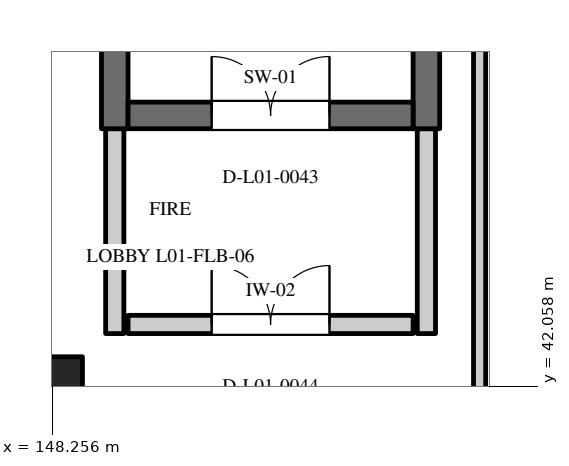
"""IFC4 building model, lengths in metres.
Left out: names, types, materials, properties, quantities, classifications, styles, units other than length and angle.
Written with IfcOpenShell. Run it as: python <this file> out.ifc"""

import sys

from ifc_helpers import new_model, si_unit, direction, frame, frame_2d, origin, origin_2d, place, context, subcontext, project, spatial, rectangle, extrude, element, fill, save


model = new_model("IFC4")
c1 = context("Model", 3, precision=1e-05, world=origin(), true_north=direction((0.0, 1.0)))
c2 = subcontext(c1, "Body", "Model", "MODEL_VIEW")
j1 = project(units=[si_unit("LENGTHUNIT", "METRE"), si_unit("PLANEANGLEUNIT", "RADIAN")], contexts=[c1])
p1 = place(None, origin())
s1 = spatial("IfcSite", under=j1, at=p1, CompositionType="ELEMENT")
p2 = place(p1, origin())
s2 = spatial("IfcBuilding", under=s1, at=p2, CompositionType="ELEMENT")
p3 = place(p2, frame((0.0, 0.0, 4.8)))
s3 = spatial("IfcBuildingStorey", under=s2, at=p3, CompositionType="ELEMENT", Elevation=4.8)
p4 = place(p3, frame((148.2, 42.0, 0.0), z_axis=(0.0, 0.0, 1.0), x_axis=(1.0, 0.0, 0.0)))
e1 = element("IfcColumn", 1, at=p4, inside=s3, PredefinedType="COLUMN", context=c2, shape_type="SweptSolid", body=[
    extrude(rectangle(XDim=0.9, YDim=0.9, at=origin_2d()), origin(), (0.0, 0.0, 1.0), 4.8),
])
for number, where, z_axis, x_axis in (
    (2, (149.075, 45.45, 0.0), (0.0, 0.0, 1.0), (0.0, 1.0, 0.0)),
    (3, (153.175, 45.45, 0.0), (0.0, 0.0, 1.0), (0.0, 1.0, 0.0)),
):
    element("IfcWall", number, at=place(p3, frame(where, z_axis=z_axis, x_axis=x_axis)), inside=s3, PredefinedType="SHEAR", context=c2, shape_type="SweptSolid", body=[
        extrude(rectangle(XDim=10.5, YDim=0.35, at=frame_2d((5.25, 0.0))), origin(), (0.0, 0.0, 1.0), 4.45),
    ])
p5 = place(p3, frame((149.25, 45.625, 0.0), z_axis=(0.0, 0.0, 1.0), x_axis=(1.0, 0.0, 0.0)))
e4 = element("IfcWall", 4, at=p5, inside=s3, PredefinedType="SHEAR", context=c2, shape_type="SweptSolid", body=[
    extrude(rectangle(XDim=3.75, YDim=0.35, at=frame_2d((1.875, 0.0))), origin(), (0.0, 0.0, 1.0), 4.45),
])
p6 = place(p5, frame((1.1, 0.0, 0.0)))
e5 = element("IfcOpeningElement", 5, at=p6, cuts=e4, PredefinedType="OPENING", context=c2, shape_type="SweptSolid", body=[
    extrude(rectangle(XDim=1.55, YDim=2.25, at=frame_2d((0.775, 1.125))), frame((0.0, 0.187, 0.0), z_axis=(0.0, -1.0, 0.0), x_axis=(1.0, 0.0, 0.0)), (0.0, 0.0, 1.0), 0.374),
])
for number, where, z_axis, x_axis in (
    (6, (149.075, 42.755, 0.0), (0.0, 0.0, 1.0), (0.0, 1.0, 0.0)),
    (7, (153.175, 42.755, 0.0), (0.0, 0.0, 1.0), (0.0, 1.0, 0.0)),
):
    element("IfcWall", number, at=place(p3, frame(where, z_axis=z_axis, x_axis=x_axis)), inside=s3, PredefinedType="STANDARD", context=c2, shape_type="SweptSolid", body=[
        extrude(rectangle(XDim=2.695, YDim=0.24, at=frame_2d((1.348, 0.0))), origin(), (0.0, 0.0, 1.0), 4.45),
    ])
p7 = place(p3, frame((149.25, 42.875, 0.0), z_axis=(0.0, 0.0, 1.0), x_axis=(1.0, 0.0, 0.0)))
e8 = element("IfcWall", 8, at=p7, inside=s3, PredefinedType="STANDARD", context=c2, shape_type="SweptSolid", body=[
    extrude(rectangle(XDim=3.75, YDim=0.24, at=frame_2d((1.875, 0.0))), origin(), (0.0, 0.0, 1.0), 4.45),
])
p8 = place(p7, frame((1.1, 0.0, 0.0)))
e9 = element("IfcOpeningElement", 9, at=p8, cuts=e8, PredefinedType="OPENING", context=c2, shape_type="SweptSolid", body=[
    extrude(rectangle(XDim=1.55, YDim=2.25, at=frame_2d((0.775, 1.125))), frame((0.0, 0.132, 0.0), z_axis=(0.0, -1.0, 0.0), x_axis=(1.0, 0.0, 0.0)), (0.0, 0.0, 1.0), 0.264),
])
p9 = place(p3, frame((153.875, 33.685, 0.0), z_axis=(0.0, 0.0, 1.0), x_axis=(0.0, 1.0, 0.0)))
e10 = element("IfcWall", 10, at=p9, inside=s3, PredefinedType="PARTITIONING", context=c2, shape_type="SweptSolid", body=[
    extrude(rectangle(XDim=13.03, YDim=0.16, at=frame_2d((6.515, 0.0))), origin(), (0.0, 0.0, 1.0), 4.43),
])
p10 = place(p6, origin())
e11 = element("IfcDoor", 11, at=p10, inside=s3, OperationType="DOUBLE_DOOR_SINGLE_SWING", PredefinedType="DOOR", context=c2, shape_type="SweptSolid", body=[
    extrude(rectangle(XDim=1.55, YDim=2.25, at=frame_2d((0.775, 1.125))), frame((0.0, 0.025, 0.0), z_axis=(0.0, -1.0, 0.0), x_axis=(1.0, 0.0, 0.0)), (0.0, 0.0, 1.0), 0.05),
])
fill(e5, e11)
p11 = place(p8, origin())
e12 = element("IfcDoor", 12, at=p11, inside=s3, OperationType="DOUBLE_DOOR_SINGLE_SWING", PredefinedType="DOOR", context=c2, shape_type="SweptSolid", body=[
    extrude(rectangle(XDim=1.55, YDim=2.25, at=frame_2d((0.775, 1.125))), frame((0.0, 0.025, 0.0), z_axis=(0.0, -1.0, 0.0), x_axis=(1.0, 0.0, 0.0)), (0.0, 0.0, 1.0), 0.05),
])
fill(e9, e12)
save(model, sys.argv[1])
